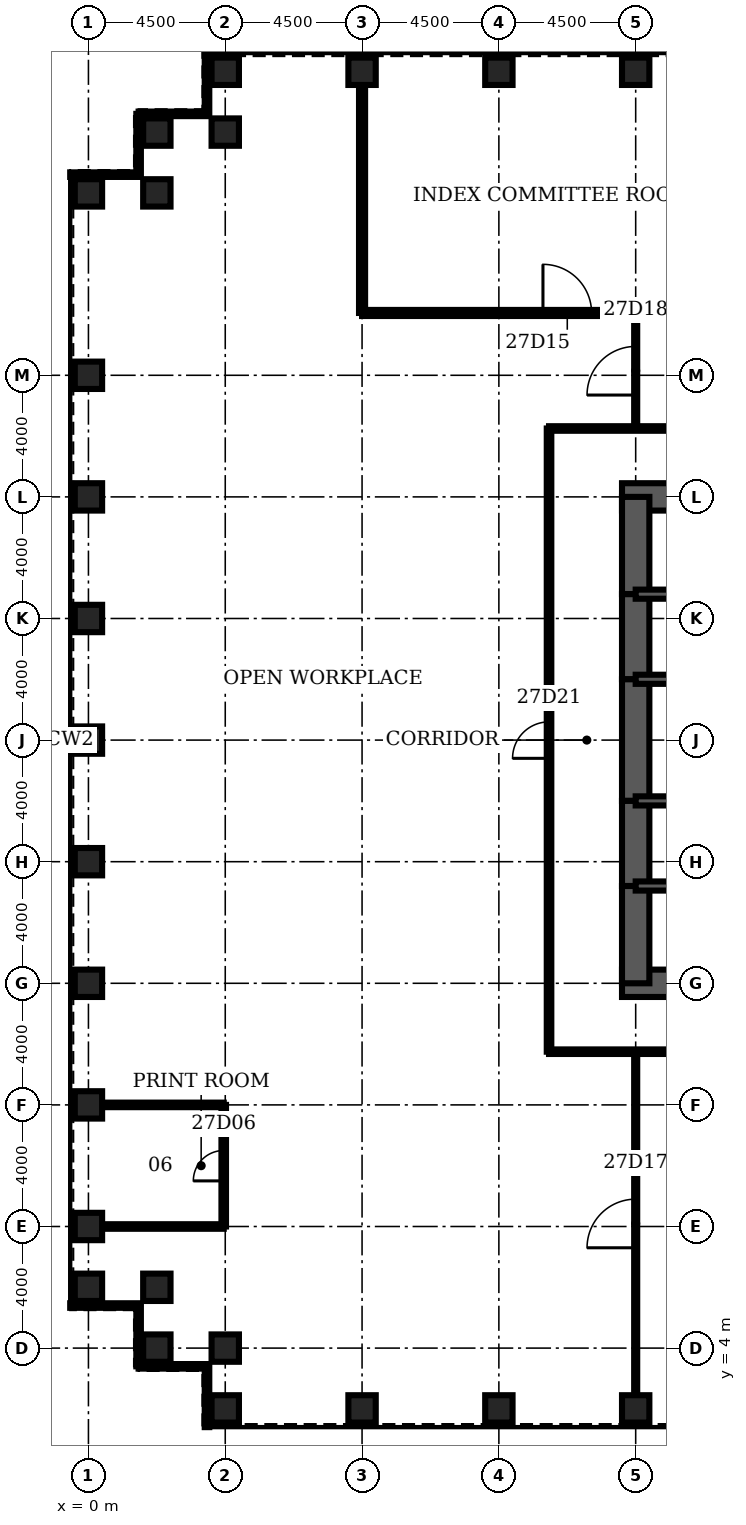
"""IFC4 building model, lengths in metres.
Left out: names, types, materials, properties, quantities, classifications, styles, units other than length and angle.
Written with IfcOpenShell. Run it as: python <this file> out.ifc"""

import sys

from ifc_helpers import new_model, si_unit, direction, frame, frame_2d, origin, origin_2d, place, context, subcontext, project, spatial, rectangle, hollow_rectangle, extrude, element, fill, save


model = new_model("IFC4")
c1 = context("Model", 3, precision=1e-05, world=origin(), true_north=direction((0.0, 1.0)))
c2 = subcontext(c1, "Body", "Model", "MODEL_VIEW")
j1 = project(units=[si_unit("LENGTHUNIT", "METRE"), si_unit("PLANEANGLEUNIT", "RADIAN")], contexts=[c1])
p1 = place(None, origin())
s1 = spatial("IfcSite", under=j1, at=p1, CompositionType="ELEMENT")
p2 = place(p1, origin())
s2 = spatial("IfcBuilding", under=s1, at=p2, CompositionType="ELEMENT")
p3 = place(p2, frame((0.0, 0.0, 125.7)))
s3 = spatial("IfcBuildingStorey", under=s2, at=p3, CompositionType="ELEMENT", Elevation=125.7)
for number, where, z_axis, x_axis in (
    (1, (4.5, 2.0, 0.0), (0.0, 0.0, 1.0), (0.0, 1.0, 0.0)),
    (2, (9.0, 2.0, 0.0), (0.0, 0.0, 1.0), (0.0, 1.0, 0.0)),
    (3, (13.5, 2.0, 0.0), (0.0, 0.0, 1.0), (0.0, 1.0, 0.0)),
    (4, (18.0, 2.0, 0.0), (0.0, 0.0, 1.0), (0.0, 1.0, 0.0)),
    (5, (18.0, 46.0, 0.0), (0.0, 0.0, 1.0), (0.0, 1.0, 0.0)),
    (6, (13.5, 46.0, 0.0), (0.0, 0.0, 1.0), (0.0, 1.0, 0.0)),
    (7, (9.0, 46.0, 0.0), (0.0, 0.0, 1.0), (0.0, 1.0, 0.0)),
    (8, (4.5, 46.0, 0.0), (0.0, 0.0, 1.0), (0.0, 1.0, 0.0)),
    (9, (4.5, 44.0, 0.0), (0.0, 0.0, 1.0), (0.0, 1.0, 0.0)),
    (10, (2.25, 44.0, 0.0), (0.0, 0.0, 1.0), (1.0, 0.0, 0.0)),
    (11, (2.25, 42.0, 0.0), (0.0, 0.0, 1.0), (1.0, 0.0, 0.0)),
    (12, (0.0, 42.0, 0.0), (0.0, 0.0, 1.0), (1.0, 0.0, 0.0)),
    (13, (0.0, 36.0, 0.0), (0.0, 0.0, 1.0), (1.0, 0.0, 0.0)),
    (14, (0.0, 32.0, 0.0), (0.0, 0.0, 1.0), (1.0, 0.0, 0.0)),
    (15, (0.0, 28.0, 0.0), (0.0, 0.0, 1.0), (1.0, 0.0, 0.0)),
    (16, (0.0, 24.0, 0.0), (0.0, 0.0, 1.0), (1.0, 0.0, 0.0)),
    (17, (0.0, 20.0, 0.0), (0.0, 0.0, 1.0), (1.0, 0.0, 0.0)),
    (18, (0.0, 16.0, 0.0), (0.0, 0.0, 1.0), (1.0, 0.0, 0.0)),
    (19, (0.0, 12.0, 0.0), (0.0, 0.0, 1.0), (1.0, 0.0, 0.0)),
    (20, (0.0, 8.0, 0.0), (0.0, 0.0, 1.0), (1.0, 0.0, 0.0)),
    (21, (0.0, 6.0, 0.0), (0.0, 0.0, 1.0), (1.0, 0.0, 0.0)),
    (22, (2.25, 6.0, 0.0), (0.0, 0.0, 1.0), (1.0, 0.0, 0.0)),
    (23, (2.25, 4.0, 0.0), (0.0, 0.0, 1.0), (1.0, 0.0, 0.0)),
    (24, (4.5, 4.0, 0.0), (0.0, 0.0, 1.0), (0.0, 1.0, 0.0)),
):
    element("IfcColumn", number, at=place(p3, frame(where, z_axis=z_axis, x_axis=x_axis)), inside=s3, PredefinedType="COLUMN", context=c2, shape_type="SweptSolid", body=[
        extrude(hollow_rectangle(XDim=0.9, YDim=0.9, WallThickness=0.1, at=origin_2d()), origin(), (0.0, 0.0, 1.0), 4.2),
    ])
for number, where, z_axis, x_axis in (
    (25, (17.55, 16.0, 0.0), (0.0, 0.0, 1.0), (1.0, 0.0, 0.0)),
    (26, (27.0, 32.0, 0.0), (0.0, 0.0, 1.0), (-1.0, 0.0, 0.0)),
):
    element("IfcWall", number, at=place(p3, frame(where, z_axis=z_axis, x_axis=x_axis)), inside=s3, PredefinedType="SHEAR", context=c2, shape_type="SweptSolid", body=[
        extrude(rectangle(XDim=9.45, YDim=0.9, at=frame_2d((4.725, 0.0))), origin(), (0.0, 0.0, 1.0), 4.2),
    ])
p4 = place(p3, frame((18.0, 32.0, 0.0), z_axis=(0.0, 0.0, 1.0), x_axis=(0.0, -1.0, 0.0)))
e27 = element("IfcWall", 27, at=p4, inside=s3, PredefinedType="SHEAR", context=c2, shape_type="SweptSolid", body=[
    extrude(rectangle(XDim=3.2, YDim=0.9, at=frame_2d((1.6, 0.0))), origin(), (0.0, 0.0, 1.0), 4.2),
])
p5 = place(p3, frame((18.0, 28.8, 0.0), z_axis=(0.0, 0.0, 1.0), x_axis=(0.0, -1.0, 0.0)))
e28 = element("IfcWall", 28, at=p5, inside=s3, PredefinedType="SHEAR", context=c2, shape_type="SweptSolid", body=[
    extrude(rectangle(XDim=2.8, YDim=0.9, at=frame_2d((1.4, 0.0))), origin(), (0.0, 0.0, 1.0), 4.2),
])
p6 = place(p5, frame((0.4, 0.0, 0.0)))
e29 = element("IfcOpeningElement", 29, at=p6, cuts=e28, PredefinedType="OPENING", context=c2, shape_type="SweptSolid", body=[
    extrude(rectangle(XDim=1.8, YDim=2.1, at=frame_2d((0.9, 1.05))), frame((0.0, 0.46, 0.0), z_axis=(0.0, -1.0, 0.0), x_axis=(1.0, 0.0, 0.0)), (0.0, 0.0, 1.0), 0.92),
])
p7 = place(p3, frame((18.0, 26.0, 0.0), z_axis=(0.0, 0.0, 1.0), x_axis=(0.0, -1.0, 0.0)))
e30 = element("IfcWall", 30, at=p7, inside=s3, PredefinedType="SHEAR", context=c2, shape_type="SweptSolid", body=[
    extrude(rectangle(XDim=4.0, YDim=0.9, at=frame_2d((2.0, 0.0))), origin(), (0.0, 0.0, 1.0), 4.2),
])
p8 = place(p3, frame((18.0, 22.0, 0.0), z_axis=(0.0, 0.0, 1.0), x_axis=(0.0, -1.0, 0.0)))
e31 = element("IfcWall", 31, at=p8, inside=s3, PredefinedType="SHEAR", context=c2, shape_type="SweptSolid", body=[
    extrude(rectangle(XDim=2.8, YDim=0.9, at=frame_2d((1.4, 0.0))), origin(), (0.0, 0.0, 1.0), 4.2),
])
p9 = place(p8, frame((0.6, 0.0, 0.0)))
e32 = element("IfcOpeningElement", 32, at=p9, cuts=e31, PredefinedType="OPENING", context=c2, shape_type="SweptSolid", body=[
    extrude(rectangle(XDim=1.8, YDim=2.1, at=frame_2d((0.9, 1.05))), frame((0.0, 0.46, 0.0), z_axis=(0.0, -1.0, 0.0), x_axis=(1.0, 0.0, 0.0)), (0.0, 0.0, 1.0), 0.92),
])
p10 = place(p3, frame((18.0, 19.2, 0.0), z_axis=(0.0, 0.0, 1.0), x_axis=(0.0, -1.0, 0.0)))
e33 = element("IfcWall", 33, at=p10, inside=s3, PredefinedType="SHEAR", context=c2, shape_type="SweptSolid", body=[
    extrude(rectangle(XDim=3.2, YDim=0.9, at=frame_2d((1.6, 0.0))), origin(), (0.0, 0.0, 1.0), 4.2),
])
p11 = place(p3, frame((18.0, 19.2, 0.0), z_axis=(0.0, 0.0, 1.0), x_axis=(1.0, 0.0, 0.0)))
e34 = element("IfcWall", 34, at=p11, inside=s3, PredefinedType="SOLIDWALL", context=c2, shape_type="SweptSolid", body=[
    extrude(rectangle(XDim=9.0, YDim=0.3, at=frame_2d((4.5, 0.0))), origin(), (0.0, 0.0, 1.0), 4.2),
])
p12 = place(p11, frame((0.65, 0.0, 0.0)))
e35 = element("IfcOpeningElement", 35, at=p12, cuts=e34, PredefinedType="OPENING", context=c2, shape_type="SweptSolid", body=[
    extrude(rectangle(XDim=1.0, YDim=2.1, at=frame_2d((0.5, 1.05))), frame((0.0, 0.16, 0.0), z_axis=(0.0, -1.0, 0.0), x_axis=(1.0, 0.0, 0.0)), (0.0, 0.0, 1.0), 0.32),
])
p13 = place(p3, frame((18.0, 28.8, 0.0), z_axis=(0.0, 0.0, 1.0), x_axis=(1.0, 0.0, 0.0)))
e36 = element("IfcWall", 36, at=p13, inside=s3, PredefinedType="SOLIDWALL", context=c2, shape_type="SweptSolid", body=[
    extrude(rectangle(XDim=9.0, YDim=0.3, at=frame_2d((4.5, 0.0))), origin(), (0.0, 0.0, 1.0), 4.2),
])
p14 = place(p13, frame((0.65, 0.0, 0.0)))
e37 = element("IfcOpeningElement", 37, at=p14, cuts=e36, PredefinedType="OPENING", context=c2, shape_type="SweptSolid", body=[
    extrude(rectangle(XDim=1.0, YDim=2.1, at=frame_2d((0.5, 1.05))), frame((0.0, 0.16, 0.0), z_axis=(0.0, -1.0, 0.0), x_axis=(1.0, 0.0, 0.0)), (0.0, 0.0, 1.0), 0.32),
])
p15 = place(p3, frame((18.0, 22.0, 0.0), z_axis=(0.0, 0.0, 1.0), x_axis=(1.0, 0.0, 0.0)))
e38 = element("IfcWall", 38, at=p15, inside=s3, PredefinedType="SOLIDWALL", context=c2, shape_type="SweptSolid", body=[
    extrude(rectangle(XDim=6.0, YDim=0.3, at=frame_2d((3.0, 0.0))), origin(), (0.0, 0.0, 1.0), 4.2),
])
p16 = place(p15, frame((4.4, 0.0, 0.0)))
e39 = element("IfcOpeningElement", 39, at=p16, cuts=e38, PredefinedType="OPENING", context=c2, shape_type="SweptSolid", body=[
    extrude(rectangle(XDim=1.0, YDim=2.1, at=frame_2d((0.5, 1.05))), frame((0.0, 0.16, 0.0), z_axis=(0.0, -1.0, 0.0), x_axis=(1.0, 0.0, 0.0)), (0.0, 0.0, 1.0), 0.32),
])
p17 = place(p15, frame((1.0, 0.0, 0.0)))
e40 = element("IfcOpeningElement", 40, at=p17, cuts=e38, PredefinedType="OPENING", context=c2, shape_type="SweptSolid", body=[
    extrude(rectangle(XDim=1.0, YDim=2.1, at=frame_2d((0.5, 1.05))), frame((0.0, 0.16, 0.0), z_axis=(0.0, -1.0, 0.0), x_axis=(1.0, 0.0, 0.0)), (0.0, 0.0, 1.0), 0.32),
])
p18 = place(p3, frame((18.0, 26.0, 0.0), z_axis=(0.0, 0.0, 1.0), x_axis=(1.0, 0.0, 0.0)))
e41 = element("IfcWall", 41, at=p18, inside=s3, PredefinedType="SOLIDWALL", context=c2, shape_type="SweptSolid", body=[
    extrude(rectangle(XDim=6.0, YDim=0.3, at=frame_2d((3.0, 0.0))), origin(), (0.0, 0.0, 1.0), 4.2),
])
for number, where, z_axis, x_axis in (
    (42, (0.45, 8.0, 0.0), (0.0, 0.0, 1.0), (1.0, 0.0, 0.0)),
    (43, (0.45, 12.0, 0.0), (0.0, 0.0, 1.0), (1.0, 0.0, 0.0)),
):
    element("IfcWall", number, at=place(p3, frame(where, z_axis=z_axis, x_axis=x_axis)), inside=s3, PredefinedType="PARTITIONING", context=c2, shape_type="SweptSolid", body=[
        extrude(rectangle(XDim=4.0, YDim=0.15, at=frame_2d((2.0, 0.0))), origin(), (0.0, 0.0, 1.0), 3.0),
    ])
p19 = place(p3, frame((15.15, 13.75, 0.0), z_axis=(0.0, 0.0, 1.0), x_axis=(1.0, 0.0, 0.0)))
e44 = element("IfcWall", 44, at=p19, inside=s3, PredefinedType="PARTITIONING", context=c2, shape_type="SweptSolid", body=[
    extrude(rectangle(XDim=6.85, YDim=0.15, at=frame_2d((3.425, 0.0))), origin(), (0.0, 0.0, 1.0), 3.0),
])
p20 = place(p3, frame((15.15, 34.25, 0.0), z_axis=(0.0, 0.0, 1.0), x_axis=(1.0, 0.0, 0.0)))
e45 = element("IfcWall", 45, at=p20, inside=s3, PredefinedType="PARTITIONING", context=c2, shape_type="SweptSolid", body=[
    extrude(rectangle(XDim=41.7, YDim=0.15, at=frame_2d((20.85, 0.0))), origin(), (0.0, 0.0, 1.0), 3.0),
])
p21 = place(p20, frame((16.225, 0.0, 0.0)))
e46 = element("IfcOpeningElement", 46, at=p21, cuts=e45, PredefinedType="OPENING", context=c2, shape_type="SweptSolid", body=[
    extrude(rectangle(XDim=1.2, YDim=2.1, at=frame_2d((0.6, 1.05))), frame((0.0, 0.085, 0.0), z_axis=(0.0, -1.0, 0.0), x_axis=(1.0, 0.0, 0.0)), (0.0, 0.0, 1.0), 0.17),
])
p22 = place(p3, frame((9.0, 38.05, 0.0), z_axis=(0.0, 0.0, 1.0), x_axis=(1.0, 0.0, 0.0)))
e47 = element("IfcWall", 47, at=p22, inside=s3, PredefinedType="PARTITIONING", context=c2, shape_type="SweptSolid", body=[
    extrude(rectangle(XDim=13.5, YDim=0.2, at=frame_2d((6.75, 0.0))), origin(), (0.0, 0.0, 1.0), 3.0),
])
p23 = place(p22, frame((5.95, 0.0, 0.0)))
e48 = element("IfcOpeningElement", 48, at=p23, cuts=e47, PredefinedType="OPENING", context=c2, shape_type="SweptSolid", body=[
    extrude(rectangle(XDim=1.6, YDim=2.1, at=frame_2d((0.8, 1.05))), frame((0.0, 0.11, 0.0), z_axis=(0.0, -1.0, 0.0), x_axis=(1.0, 0.0, 0.0)), (0.0, 0.0, 1.0), 0.22),
])
p24 = place(p3, frame((4.45, 8.0, 0.0), z_axis=(0.0, 0.0, 1.0), x_axis=(0.0, 1.0, 0.0)))
e49 = element("IfcWall", 49, at=p24, inside=s3, PredefinedType="PARTITIONING", context=c2, shape_type="SweptSolid", body=[
    extrude(rectangle(XDim=4.0, YDim=0.15, at=frame_2d((2.0, 0.0))), origin(), (0.0, 0.0, 1.0), 3.0),
])
p25 = place(p24, frame((1.5, 0.0, 0.0)))
e50 = element("IfcOpeningElement", 50, at=p25, cuts=e49, PredefinedType="OPENING", context=c2, shape_type="SweptSolid", body=[
    extrude(rectangle(XDim=1.0, YDim=2.1, at=frame_2d((0.5, 1.05))), frame((0.0, 0.085, 0.0), z_axis=(0.0, -1.0, 0.0), x_axis=(1.0, 0.0, 0.0)), (0.0, 0.0, 1.0), 0.17),
])
p26 = place(p3, frame((9.0, 38.05, 0.0), z_axis=(0.0, 0.0, 1.0), x_axis=(0.0, 1.0, 0.0)))
e51 = element("IfcWall", 51, at=p26, inside=s3, PredefinedType="PARTITIONING", context=c2, shape_type="SweptSolid", body=[
    extrude(rectangle(XDim=7.5, YDim=0.2, at=frame_2d((3.75, 0.0))), origin(), (0.0, 0.0, 1.0), 3.0),
])
p27 = place(p3, frame((15.15, 13.75, 0.0), z_axis=(0.0, 0.0, 1.0), x_axis=(0.0, 1.0, 0.0)))
e52 = element("IfcWall", 52, at=p27, inside=s3, PredefinedType="PARTITIONING", context=c2, shape_type="SweptSolid", body=[
    extrude(rectangle(XDim=20.5, YDim=0.15, at=frame_2d((10.25, 0.0))), origin(), (0.0, 0.0, 1.0), 3.0),
])
p28 = place(p27, frame((9.65, 0.0, 0.0)))
e53 = element("IfcOpeningElement", 53, at=p28, cuts=e52, PredefinedType="OPENING", context=c2, shape_type="SweptSolid", body=[
    extrude(rectangle(XDim=1.2, YDim=2.1, at=frame_2d((0.6, 1.05))), frame((0.0, 0.085, 0.0), z_axis=(0.0, -1.0, 0.0), x_axis=(1.0, 0.0, 0.0)), (0.0, 0.0, 1.0), 0.17),
])
p29 = place(p3, frame((18.0, 2.45, 0.0), z_axis=(0.0, 0.0, 1.0), x_axis=(0.0, 1.0, 0.0)))
e54 = element("IfcWall", 54, at=p29, inside=s3, PredefinedType="PARTITIONING", context=c2, shape_type="SweptSolid", body=[
    extrude(rectangle(XDim=11.3, YDim=0.1, at=frame_2d((5.65, 0.0))), origin(), (0.0, 0.0, 1.0), 3.0),
])
p30 = place(p29, frame((4.85, 0.0, 0.0)))
e55 = element("IfcOpeningElement", 55, at=p30, cuts=e54, PredefinedType="OPENING", context=c2, shape_type="SweptSolid", body=[
    extrude(rectangle(XDim=1.6, YDim=2.1, at=frame_2d((0.8, 1.05))), frame((0.0, 0.06, 0.0), z_axis=(0.0, -1.0, 0.0), x_axis=(1.0, 0.0, 0.0)), (0.0, 0.0, 1.0), 0.12),
])
p31 = place(p3, frame((18.0, 34.25, 0.0), z_axis=(0.0, 0.0, 1.0), x_axis=(0.0, 1.0, 0.0)))
e56 = element("IfcWall", 56, at=p31, inside=s3, PredefinedType="PARTITIONING", context=c2, shape_type="SweptSolid", body=[
    extrude(rectangle(XDim=3.8, YDim=0.1, at=frame_2d((1.9, 0.0))), origin(), (0.0, 0.0, 1.0), 3.0),
])
p32 = place(p31, frame((1.1, 0.0, 0.0)))
e57 = element("IfcOpeningElement", 57, at=p32, cuts=e56, PredefinedType="OPENING", context=c2, shape_type="SweptSolid", body=[
    extrude(rectangle(XDim=1.6, YDim=2.1, at=frame_2d((0.8, 1.05))), frame((0.0, 0.06, 0.0), z_axis=(0.0, -1.0, 0.0), x_axis=(1.0, 0.0, 0.0)), (0.0, 0.0, 1.0), 0.12),
])
p33 = place(p3, frame((3.9, 46.6, 0.0), z_axis=(0.0, 0.0, 1.0), x_axis=(0.0, -1.0, 0.0)))
e58 = element("IfcWall", 58, at=p33, inside=s3, PredefinedType="ELEMENTEDWALL", context=c2, shape_type="SweptSolid", body=[
    extrude(rectangle(XDim=2.0, YDim=0.15, at=frame_2d((1.0, 0.0))), origin(), (0.0, 0.0, 1.0), 4.04),
])
p34 = place(p3, frame((3.9, 44.6, 0.0), z_axis=(0.0, 0.0, 1.0), x_axis=(-1.0, 0.0, 0.0)))
e59 = element("IfcWall", 59, at=p34, inside=s3, PredefinedType="ELEMENTEDWALL", context=c2, shape_type="SweptSolid", body=[
    extrude(rectangle(XDim=2.25, YDim=0.15, at=frame_2d((1.125, 0.0))), origin(), (0.0, 0.0, 1.0), 4.04),
])
p35 = place(p3, frame((1.65, 44.6, 0.0), z_axis=(0.0, 0.0, 1.0), x_axis=(0.0, -1.0, 0.0)))
e60 = element("IfcWall", 60, at=p35, inside=s3, PredefinedType="ELEMENTEDWALL", context=c2, shape_type="SweptSolid", body=[
    extrude(rectangle(XDim=2.0, YDim=0.15, at=frame_2d((1.0, 0.0))), origin(), (0.0, 0.0, 1.0), 4.04),
])
for number, where, z_axis, x_axis in (
    (61, (1.65, 42.6, 0.0), (0.0, 0.0, 1.0), (-1.0, 0.0, 0.0)),
    (62, (-0.6, 5.4, 0.0), (0.0, 0.0, 1.0), (1.0, 0.0, 0.0)),
):
    element("IfcWall", number, at=place(p3, frame(where, z_axis=z_axis, x_axis=x_axis)), inside=s3, PredefinedType="ELEMENTEDWALL", context=c2, shape_type="SweptSolid", body=[
        extrude(rectangle(XDim=2.25, YDim=0.15, at=frame_2d((1.125, 0.0))), origin(), (0.0, 0.0, 1.0), 4.04),
    ])
p36 = place(p3, frame((1.65, 5.4, 0.0), z_axis=(0.0, 0.0, 1.0), x_axis=(0.0, -1.0, 0.0)))
e63 = element("IfcWall", 63, at=p36, inside=s3, PredefinedType="ELEMENTEDWALL", context=c2, shape_type="SweptSolid", body=[
    extrude(rectangle(XDim=2.0, YDim=0.15, at=frame_2d((1.0, 0.0))), origin(), (0.0, 0.0, 1.0), 4.04),
])
p37 = place(p3, frame((1.65, 3.4, 0.0), z_axis=(0.0, 0.0, 1.0), x_axis=(1.0, 0.0, 0.0)))
e64 = element("IfcWall", 64, at=p37, inside=s3, PredefinedType="ELEMENTEDWALL", context=c2, shape_type="SweptSolid", body=[
    extrude(rectangle(XDim=2.25, YDim=0.15, at=frame_2d((1.125, 0.0))), origin(), (0.0, 0.0, 1.0), 4.04),
])
p38 = place(p3, frame((3.9, 3.4, 0.0), z_axis=(0.0, 0.0, 1.0), x_axis=(0.0, -1.0, 0.0)))
e65 = element("IfcWall", 65, at=p38, inside=s3, PredefinedType="ELEMENTEDWALL", context=c2, shape_type="SweptSolid", body=[
    extrude(rectangle(XDim=2.0, YDim=0.15, at=frame_2d((1.0, 0.0))), origin(), (0.0, 0.0, 1.0), 4.04),
])
p39 = place(p25, origin())
e66 = element("IfcDoor", 66, at=p39, inside=s3, OperationType="SINGLE_SWING_LEFT", PredefinedType="DOOR", context=c2, shape_type="SweptSolid", body=[
    extrude(rectangle(XDim=1.0, YDim=2.1, at=frame_2d((0.5, 1.05))), frame((0.0, 0.025, 0.0), z_axis=(0.0, -1.0, 0.0), x_axis=(1.0, 0.0, 0.0)), (0.0, 0.0, 1.0), 0.05),
])
fill(e50, e66)
p40 = place(p23, origin())
e67 = element("IfcDoor", 67, at=p40, inside=s3, OperationType="SINGLE_SWING_LEFT", PredefinedType="DOOR", context=c2, shape_type="SweptSolid", body=[
    extrude(rectangle(XDim=1.6, YDim=2.1, at=frame_2d((0.8, 1.05))), frame((0.0, 0.025, 0.0), z_axis=(0.0, -1.0, 0.0), x_axis=(1.0, 0.0, 0.0)), (0.0, 0.0, 1.0), 0.05),
])
fill(e48, e67)
p41 = place(p30, origin())
e68 = element("IfcDoor", 68, at=p41, inside=s3, OperationType="SINGLE_SWING_LEFT", PredefinedType="DOOR", context=c2, shape_type="SweptSolid", body=[
    extrude(rectangle(XDim=1.6, YDim=2.1, at=frame_2d((0.8, 1.05))), frame((0.0, 0.025, 0.0), z_axis=(0.0, -1.0, 0.0), x_axis=(1.0, 0.0, 0.0)), (0.0, 0.0, 1.0), 0.05),
])
fill(e55, e68)
p42 = place(p32, origin())
e69 = element("IfcDoor", 69, at=p42, inside=s3, OperationType="SINGLE_SWING_LEFT", PredefinedType="DOOR", context=c2, shape_type="SweptSolid", body=[
    extrude(rectangle(XDim=1.6, YDim=2.1, at=frame_2d((0.8, 1.05))), frame((0.0, 0.025, 0.0), z_axis=(0.0, -1.0, 0.0), x_axis=(1.0, 0.0, 0.0)), (0.0, 0.0, 1.0), 0.05),
])
fill(e57, e69)
p43 = place(p28, origin())
e70 = element("IfcDoor", 70, at=p43, inside=s3, OperationType="SINGLE_SWING_LEFT", PredefinedType="DOOR", context=c2, shape_type="SweptSolid", body=[
    extrude(rectangle(XDim=1.2, YDim=2.1, at=frame_2d((0.6, 1.05))), frame((0.0, 0.025, 0.0), z_axis=(0.0, -1.0, 0.0), x_axis=(1.0, 0.0, 0.0)), (0.0, 0.0, 1.0), 0.05),
])
fill(e53, e70)
p44 = place(p12, origin())
e71 = element("IfcDoor", 71, at=p44, inside=s3, OperationType="SINGLE_SWING_LEFT", PredefinedType="DOOR", context=c2, shape_type="SweptSolid", body=[
    extrude(rectangle(XDim=1.0, YDim=2.1, at=frame_2d((0.5, 1.05))), frame((0.0, 0.025, 0.0), z_axis=(0.0, -1.0, 0.0), x_axis=(1.0, 0.0, 0.0)), (0.0, 0.0, 1.0), 0.05),
])
fill(e35, e71)
p45 = place(p14, origin())
e72 = element("IfcDoor", 72, at=p45, inside=s3, OperationType="SINGLE_SWING_LEFT", PredefinedType="DOOR", context=c2, shape_type="SweptSolid", body=[
    extrude(rectangle(XDim=1.0, YDim=2.1, at=frame_2d((0.5, 1.05))), frame((0.0, 0.025, 0.0), z_axis=(0.0, -1.0, 0.0), x_axis=(1.0, 0.0, 0.0)), (0.0, 0.0, 1.0), 0.05),
])
fill(e37, e72)
p46 = place(p9, origin())
e73 = element("IfcDoor", 73, at=p46, inside=s3, OperationType="SINGLE_SWING_LEFT", PredefinedType="DOOR", context=c2, shape_type="SweptSolid", body=[
    extrude(rectangle(XDim=1.8, YDim=2.1, at=frame_2d((0.9, 1.05))), frame((0.0, 0.45, 0.0), z_axis=(0.0, -1.0, 0.0), x_axis=(1.0, 0.0, 0.0)), (0.0, 0.0, 1.0), 0.899),
])
fill(e32, e73)
p47 = place(p6, origin())
e74 = element("IfcDoor", 74, at=p47, inside=s3, OperationType="SINGLE_SWING_LEFT", PredefinedType="DOOR", context=c2, shape_type="SweptSolid", body=[
    extrude(rectangle(XDim=1.8, YDim=2.1, at=frame_2d((0.9, 1.05))), frame((0.0, 0.45, 0.0), z_axis=(0.0, -1.0, 0.0), x_axis=(1.0, 0.0, 0.0)), (0.0, 0.0, 1.0), 0.899),
])
fill(e29, e74)
save(model, sys.argv[1])
